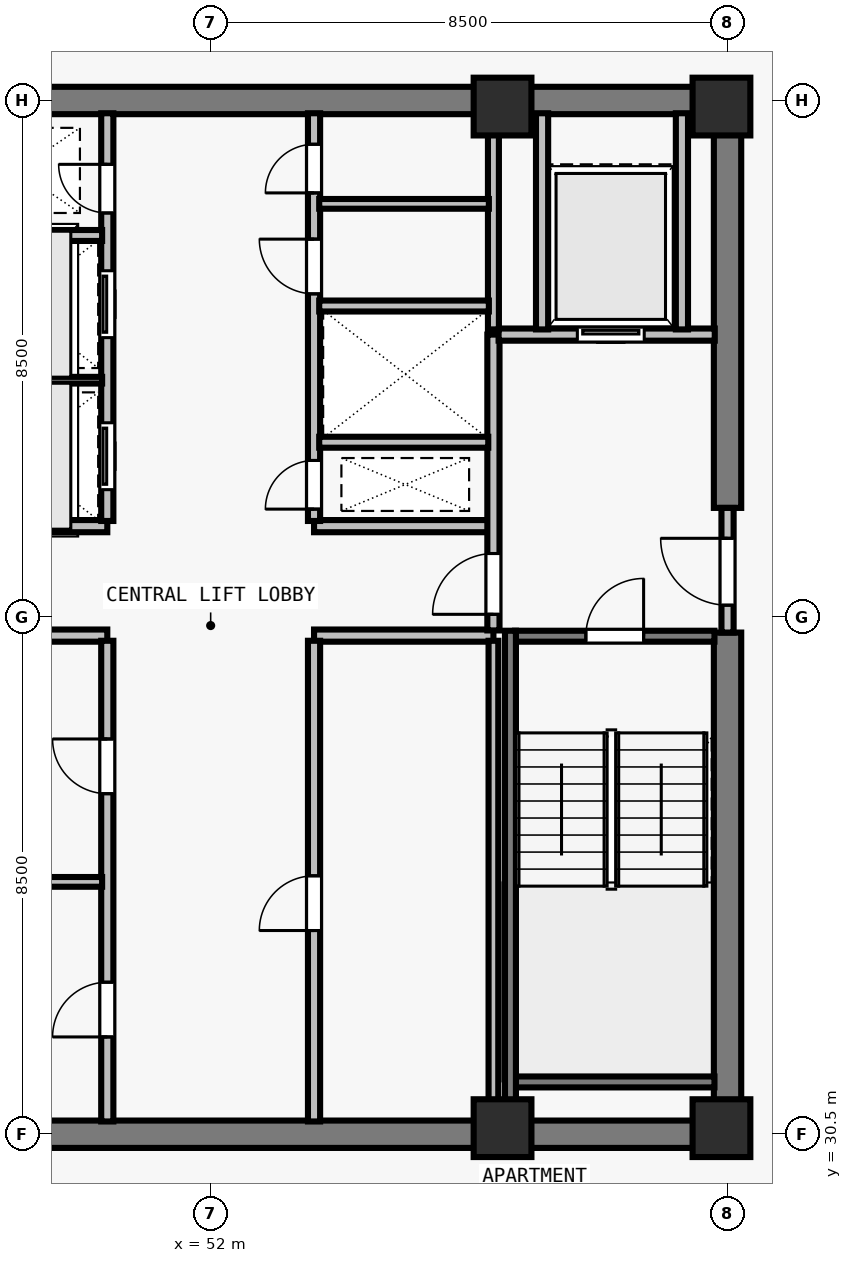
"""IFC4 building model, lengths in metres.
Left out: names, types, materials, properties, quantities, classifications, styles, units other than length and angle.
Written with IfcOpenShell. Run it as: python <this file> out.ifc"""

import sys

from ifc_helpers import new_model, si_unit, direction, frame, frame_2d, origin, origin_2d, place, context, subcontext, project, spatial, rectangle, extrude, element, fill, save


model = new_model("IFC4")
c1 = context("Model", 3, precision=1e-05, world=origin(), true_north=direction((0.0, 1.0)))
c2 = subcontext(c1, "Body", "Model", "MODEL_VIEW")
j1 = project(units=[si_unit("LENGTHUNIT", "METRE"), si_unit("PLANEANGLEUNIT", "RADIAN")], contexts=[c1])
p1 = place(None, origin())
s1 = spatial("IfcSite", under=j1, at=p1, CompositionType="ELEMENT")
p2 = place(p1, origin())
s2 = spatial("IfcBuilding", under=s1, at=p2, CompositionType="ELEMENT")
p3 = place(p2, frame((0.0, 0.0, 213.0)))
s3 = spatial("IfcBuildingStorey", under=s2, at=p3, CompositionType="ELEMENT", Elevation=213.0)
for number, where, z_axis, x_axis in (
    (1, (56.8, 30.6, 0.0), (0.0, 0.0, 1.0), (1.0, 0.0, 0.0)),
    (2, (60.4, 30.6, 0.0), (0.0, 0.0, 1.0), (1.0, 0.0, 0.0)),
    (3, (56.8, 47.4, 0.0), (0.0, 0.0, 1.0), (1.0, 0.0, 0.0)),
    (4, (60.4, 47.4, 0.0), (0.0, 0.0, 1.0), (1.0, 0.0, 0.0)),
):
    element("IfcColumn", number, at=place(p3, frame(where, z_axis=z_axis, x_axis=x_axis)), inside=s3, PredefinedType="COLUMN", context=c2, shape_type="SweptSolid", body=[
        extrude(rectangle(XDim=0.95, YDim=0.95, at=origin_2d()), origin(), (0.0, 0.0, 1.0), 3.5),
    ])
for number, where, z_axis, x_axis in (
    (5, (43.275, 30.5, 0.0), (0.0, 0.0, 1.0), (1.0, 0.0, 0.0)),
    (6, (43.275, 47.5, 0.0), (0.0, 0.0, 1.0), (1.0, 0.0, 0.0)),
):
    element("IfcWall", number, at=place(p3, frame(where, z_axis=z_axis, x_axis=x_axis)), inside=s3, PredefinedType="SHEAR", context=c2, shape_type="SweptSolid", body=[
        extrude(rectangle(XDim=17.45, YDim=0.45, at=frame_2d((8.725, 0.0))), origin(), (0.0, 0.0, 1.0), 3.29),
    ])
p4 = place(p3, frame((60.5, 30.715, 0.0), z_axis=(0.0, 0.0, 1.0), x_axis=(0.0, 1.0, 0.0)))
e7 = element("IfcWall", 7, at=p4, inside=s3, PredefinedType="SHEAR", context=c2, shape_type="SweptSolid", body=[
    extrude(rectangle(XDim=8.035, YDim=0.45, at=frame_2d((4.018, 0.0))), origin(), (0.0, 0.0, 1.0), 3.29),
])
p5 = place(p3, frame((60.5, 40.8, 0.0), z_axis=(0.0, 0.0, 1.0), x_axis=(0.0, 1.0, 0.0)))
e8 = element("IfcWall", 8, at=p5, inside=s3, PredefinedType="SHEAR", context=c2, shape_type="SweptSolid", body=[
    extrude(rectangle(XDim=6.485, YDim=0.45, at=frame_2d((3.242, 0.0))), origin(), (0.0, 0.0, 1.0), 3.29),
])
for number, where, z_axis, x_axis in (
    (9, (47.35, 38.7, 0.0), (0.0, 0.0, 1.0), (1.0, 0.0, 0.0)),
    (10, (47.35, 40.5, 0.0), (0.0, 0.0, 1.0), (1.0, 0.0, 0.0)),
    (11, (53.7, 38.7, 0.0), (0.0, 0.0, 1.0), (1.0, 0.0, 0.0)),
    (12, (53.7, 40.5, 0.0), (0.0, 0.0, 1.0), (1.0, 0.0, 0.0)),
):
    element("IfcWall", number, at=place(p3, frame(where, z_axis=z_axis, x_axis=x_axis)), inside=s3, PredefinedType="SOLIDWALL", context=c2, shape_type="SweptSolid", body=[
        extrude(rectangle(XDim=2.95, YDim=0.2, at=frame_2d((1.475, 0.0))), origin(), (0.0, 0.0, 1.0), 3.29),
    ])
p6 = place(p3, frame((50.3, 30.71, 0.0), z_axis=(0.0, 0.0, 1.0), x_axis=(0.0, 1.0, 0.0)))
e13 = element("IfcWall", 13, at=p6, inside=s3, PredefinedType="SOLIDWALL", context=c2, shape_type="SweptSolid", body=[
    extrude(rectangle(XDim=7.905, YDim=0.2, at=frame_2d((3.953, 0.0))), origin(), (0.0, 0.0, 1.0), 3.29),
])
p7 = place(p6, frame((1.39, 0.0, 0.0)))
e14 = element("IfcOpeningElement", 14, at=p7, cuts=e13, PredefinedType="OPENING", context=c2, shape_type="SweptSolid", body=[
    extrude(rectangle(XDim=0.9, YDim=2.12, at=frame_2d((0.45, 1.06))), frame((0.0, 0.11, 0.0), z_axis=(0.0, -1.0, 0.0), x_axis=(1.0, 0.0, 0.0)), (0.0, 0.0, 1.0), 0.22),
])
p8 = place(p6, frame((5.39, 0.0, 0.0)))
e15 = element("IfcOpeningElement", 15, at=p8, cuts=e13, PredefinedType="OPENING", context=c2, shape_type="SweptSolid", body=[
    extrude(rectangle(XDim=0.9, YDim=2.12, at=frame_2d((0.45, 1.06))), frame((0.0, 0.11, 0.0), z_axis=(0.0, -1.0, 0.0), x_axis=(1.0, 0.0, 0.0)), (0.0, 0.0, 1.0), 0.22),
])
p9 = place(p3, frame((53.7, 30.71, 0.0), z_axis=(0.0, 0.0, 1.0), x_axis=(0.0, 1.0, 0.0)))
e16 = element("IfcWall", 16, at=p9, inside=s3, PredefinedType="SOLIDWALL", context=c2, shape_type="SweptSolid", body=[
    extrude(rectangle(XDim=7.905, YDim=0.2, at=frame_2d((3.953, 0.0))), origin(), (0.0, 0.0, 1.0), 3.29),
])
p10 = place(p9, frame((3.14, 0.0, 0.0)))
e17 = element("IfcOpeningElement", 17, at=p10, cuts=e16, PredefinedType="OPENING", context=c2, shape_type="SweptSolid", body=[
    extrude(rectangle(XDim=0.9, YDim=2.12, at=frame_2d((0.45, 1.06))), frame((0.0, 0.11, 0.0), z_axis=(0.0, -1.0, 0.0), x_axis=(1.0, 0.0, 0.0)), (0.0, 0.0, 1.0), 0.22),
])
p11 = place(p3, frame((50.3, 40.585, 0.0), z_axis=(0.0, 0.0, 1.0), x_axis=(0.0, 1.0, 0.0)))
e18 = element("IfcWall", 18, at=p11, inside=s3, PredefinedType="SOLIDWALL", context=c2, shape_type="SweptSolid", body=[
    extrude(rectangle(XDim=6.705, YDim=0.2, at=frame_2d((3.353, 0.0))), origin(), (0.0, 0.0, 1.0), 3.29),
])
p12 = place(p11, frame((0.515, 0.0, 0.0)))
e19 = element("IfcOpeningElement", 19, at=p12, cuts=e18, PredefinedType="OPENING", context=c2, shape_type="SweptSolid", body=[
    extrude(rectangle(XDim=1.1, YDim=2.2, at=frame_2d((0.55, 1.1))), frame((0.0, 0.11, 0.0), z_axis=(0.0, -1.0, 0.0), x_axis=(1.0, 0.0, 0.0)), (0.0, 0.0, 1.0), 0.22),
])
p13 = place(p11, frame((3.015, 0.0, 0.0)))
e20 = element("IfcOpeningElement", 20, at=p13, cuts=e18, PredefinedType="OPENING", context=c2, shape_type="SweptSolid", body=[
    extrude(rectangle(XDim=1.1, YDim=2.2, at=frame_2d((0.55, 1.1))), frame((0.0, 0.11, 0.0), z_axis=(0.0, -1.0, 0.0), x_axis=(1.0, 0.0, 0.0)), (0.0, 0.0, 1.0), 0.22),
])
p14 = place(p11, frame((5.065, 0.0, 0.0)))
e21 = element("IfcOpeningElement", 21, at=p14, cuts=e18, PredefinedType="OPENING", context=c2, shape_type="SweptSolid", body=[
    extrude(rectangle(XDim=0.8, YDim=2.08, at=frame_2d((0.4, 1.04))), frame((0.0, 0.11, 0.0), z_axis=(0.0, -1.0, 0.0), x_axis=(1.0, 0.0, 0.0)), (0.0, 0.0, 1.0), 0.22),
])
p15 = place(p3, frame((53.7, 40.585, 0.0), z_axis=(0.0, 0.0, 1.0), x_axis=(0.0, 1.0, 0.0)))
e22 = element("IfcWall", 22, at=p15, inside=s3, PredefinedType="SOLIDWALL", context=c2, shape_type="SweptSolid", body=[
    extrude(rectangle(XDim=6.705, YDim=0.2, at=frame_2d((3.353, 0.0))), origin(), (0.0, 0.0, 1.0), 3.29),
])
p16 = place(p15, frame((0.195, 0.0, 0.0)))
e23 = element("IfcOpeningElement", 23, at=p16, cuts=e22, PredefinedType="OPENING", context=c2, shape_type="SweptSolid", body=[
    extrude(rectangle(XDim=0.8, YDim=2.08, at=frame_2d((0.4, 1.04))), frame((0.0, 0.11, 0.0), z_axis=(0.0, -1.0, 0.0), x_axis=(1.0, 0.0, 0.0)), (0.0, 0.0, 1.0), 0.22),
])
p17 = place(p15, frame((3.735, 0.0, 0.0)))
e24 = element("IfcOpeningElement", 24, at=p17, cuts=e22, PredefinedType="OPENING", context=c2, shape_type="SweptSolid", body=[
    extrude(rectangle(XDim=0.9, YDim=2.12, at=frame_2d((0.45, 1.06))), frame((0.0, 0.11, 0.0), z_axis=(0.0, -1.0, 0.0), x_axis=(1.0, 0.0, 0.0)), (0.0, 0.0, 1.0), 0.22),
])
p18 = place(p15, frame((5.395, 0.0, 0.0)))
e25 = element("IfcOpeningElement", 25, at=p18, cuts=e22, PredefinedType="OPENING", context=c2, shape_type="SweptSolid", body=[
    extrude(rectangle(XDim=0.8, YDim=2.1, at=frame_2d((0.4, 1.05))), frame((0.0, 0.11, 0.0), z_axis=(0.0, -1.0, 0.0), x_axis=(1.0, 0.0, 0.0)), (0.0, 0.0, 1.0), 0.22),
])
p19 = place(p3, frame((60.5, 38.75, 0.0), z_axis=(0.0, 0.0, 1.0), x_axis=(0.0, 1.0, 0.0)))
e26 = element("IfcWall", 26, at=p19, inside=s3, PredefinedType="SOLIDWALL", context=c2, shape_type="SweptSolid", body=[
    extrude(rectangle(XDim=2.05, YDim=0.2, at=frame_2d((1.025, 0.0))), origin(), (0.0, 0.0, 1.0), 3.29),
])
p20 = place(p19, frame((0.45, 0.0, 0.0)))
e27 = element("IfcOpeningElement", 27, at=p20, cuts=e26, PredefinedType="OPENING", context=c2, shape_type="SweptSolid", body=[
    extrude(rectangle(XDim=1.1, YDim=2.15, at=frame_2d((0.55, 1.075))), frame((0.0, 0.11, 0.0), z_axis=(0.0, -1.0, 0.0), x_axis=(1.0, 0.0, 0.0)), (0.0, 0.0, 1.0), 0.22),
])
p21 = place(p3, frame((56.65, 38.785, 0.0), z_axis=(0.0, 0.0, 1.0), x_axis=(0.0, 1.0, 0.0)))
e28 = element("IfcWall", 28, at=p21, inside=s3, PredefinedType="SOLIDWALL", context=c2, shape_type="SweptSolid", body=[
    extrude(rectangle(XDim=4.865, YDim=0.2, at=frame_2d((2.433, 0.0))), origin(), (0.0, 0.0, 1.0), 3.29),
])
p22 = place(p21, frame((0.265, 0.0, 0.0)))
e29 = element("IfcOpeningElement", 29, at=p22, cuts=e28, PredefinedType="OPENING", context=c2, shape_type="SweptSolid", body=[
    extrude(rectangle(XDim=1.0, YDim=2.15, at=frame_2d((0.5, 1.075))), frame((0.0, 0.11, 0.0), z_axis=(0.0, -1.0, 0.0), x_axis=(1.0, 0.0, 0.0)), (0.0, 0.0, 1.0), 0.22),
])
p23 = place(p3, frame((56.735, 43.65, 0.0), z_axis=(0.0, 0.0, 1.0), x_axis=(1.0, 0.0, 0.0)))
e30 = element("IfcWall", 30, at=p23, inside=s3, PredefinedType="SOLIDWALL", context=c2, shape_type="SweptSolid", body=[
    extrude(rectangle(XDim=3.555, YDim=0.2, at=frame_2d((1.777, 0.0))), origin(), (0.0, 0.0, 1.0), 3.29),
])
p24 = place(p23, frame((1.295, 0.0, 0.0)))
e31 = element("IfcOpeningElement", 31, at=p24, cuts=e30, PredefinedType="OPENING", context=c2, shape_type="SweptSolid", body=[
    extrude(rectangle(XDim=1.1, YDim=2.2, at=frame_2d((0.55, 1.1))), frame((0.0, 0.11, 0.0), z_axis=(0.0, -1.0, 0.0), x_axis=(1.0, 0.0, 0.0)), (0.0, 0.0, 1.0), 0.22),
])
for number, where, z_axis, x_axis in (
    (32, (57.45, 43.735, 0.0), (0.0, 0.0, 1.0), (0.0, 1.0, 0.0)),
    (33, (59.75, 43.735, 0.0), (0.0, 0.0, 1.0), (0.0, 1.0, 0.0)),
):
    element("IfcWall", number, at=place(p3, frame(where, z_axis=z_axis, x_axis=x_axis)), inside=s3, PredefinedType="SOLIDWALL", context=c2, shape_type="SweptSolid", body=[
        extrude(rectangle(XDim=3.555, YDim=0.2, at=frame_2d((1.777, 0.0))), origin(), (0.0, 0.0, 1.0), 3.29),
    ])
p25 = place(p3, frame((47.415, 34.65, 0.0), z_axis=(0.0, 0.0, 1.0), x_axis=(1.0, 0.0, 0.0)))
e34 = element("IfcWall", 34, at=p25, inside=s3, PredefinedType="PARTITIONING", context=c2, shape_type="SweptSolid", body=[
    extrude(rectangle(XDim=2.8, YDim=0.16, at=frame_2d((1.4, 0.0))), origin(), (0.0, 0.0, 1.0), 3.29),
])
p26 = place(p3, frame((56.65, 30.71, 0.0), z_axis=(0.0, 0.0, 1.0), x_axis=(0.0, 1.0, 0.0)))
e35 = element("IfcWall", 35, at=p26, inside=s3, PredefinedType="PARTITIONING", context=c2, shape_type="SweptSolid", body=[
    extrude(rectangle(XDim=7.905, YDim=0.16, at=frame_2d((3.953, 0.0))), origin(), (0.0, 0.0, 1.0), 3.29),
])
p27 = place(p3, frame((47.435, 42.9, 0.0), z_axis=(0.0, 0.0, 1.0), x_axis=(1.0, 0.0, 0.0)))
e36 = element("IfcWall", 36, at=p27, inside=s3, PredefinedType="PARTITIONING", context=c2, shape_type="SweptSolid", body=[
    extrude(rectangle(XDim=2.78, YDim=0.11, at=frame_2d((1.39, 0.0))), origin(), (0.0, 0.0, 1.0), 3.29),
])
p28 = place(p3, frame((47.425, 45.28, 0.0), z_axis=(0.0, 0.0, 1.0), x_axis=(1.0, 0.0, 0.0)))
e37 = element("IfcWall", 37, at=p28, inside=s3, PredefinedType="SOLIDWALL", context=c2, shape_type="SweptSolid", body=[
    extrude(rectangle(XDim=2.79, YDim=0.18, at=frame_2d((1.395, 0.0))), origin(), (0.0, 0.0, 1.0), 3.29),
])
p29 = place(p3, frame((56.65, 43.735, 0.0), z_axis=(0.0, 0.0, 1.0), x_axis=(0.0, 1.0, 0.0)))
e38 = element("IfcWall", 38, at=p29, inside=s3, PredefinedType="SOLIDWALL", context=c2, shape_type="SweptSolid", body=[
    extrude(rectangle(XDim=3.555, YDim=0.18, at=frame_2d((1.777, 0.0))), origin(), (0.0, 0.0, 1.0), 3.29),
])
p30 = place(p3, frame((53.785, 41.88, 0.0), z_axis=(0.0, 0.0, 1.0), x_axis=(1.0, 0.0, 0.0)))
e39 = element("IfcWall", 39, at=p30, inside=s3, PredefinedType="SOLIDWALL", context=c2, shape_type="SweptSolid", body=[
    extrude(rectangle(XDim=2.78, YDim=0.18, at=frame_2d((1.39, 0.0))), origin(), (0.0, 0.0, 1.0), 3.29),
])
p31 = place(p3, frame((53.785, 44.12, 0.0), z_axis=(0.0, 0.0, 1.0), x_axis=(1.0, 0.0, 0.0)))
e40 = element("IfcWall", 40, at=p31, inside=s3, PredefinedType="SOLIDWALL", context=c2, shape_type="SweptSolid", body=[
    extrude(rectangle(XDim=2.79, YDim=0.18, at=frame_2d((1.395, 0.0))), origin(), (0.0, 0.0, 1.0), 3.29),
])
p32 = place(p3, frame((53.785, 45.8, 0.0), z_axis=(0.0, 0.0, 1.0), x_axis=(1.0, 0.0, 0.0)))
e41 = element("IfcWall", 41, at=p32, inside=s3, PredefinedType="PARTITIONING", context=c2, shape_type="SweptSolid", body=[
    extrude(rectangle(XDim=2.79, YDim=0.16, at=frame_2d((1.395, 0.0))), origin(), (0.0, 0.0, 1.0), 3.29),
])
p33 = place(p3, frame((57.005, 38.69, 0.0), z_axis=(0.0, 0.0, 1.0), x_axis=(1.0, 0.0, 0.0)))
e42 = element("IfcWall", 42, at=p33, inside=s3, PredefinedType="SOLIDWALL", context=c2, shape_type="SweptSolid", body=[
    extrude(rectangle(XDim=3.28, YDim=0.18, at=frame_2d((1.64, 0.0))), origin(), (0.0, 0.0, 1.0), 3.29),
])
p34 = place(p33, frame((1.165, 0.0, 0.0)))
e43 = element("IfcOpeningElement", 43, at=p34, cuts=e42, PredefinedType="OPENING", context=c2, shape_type="SweptSolid", body=[
    extrude(rectangle(XDim=0.95, YDim=2.15, at=frame_2d((0.475, 1.075))), frame((0.0, 0.1, 0.0), z_axis=(0.0, -1.0, 0.0), x_axis=(1.0, 0.0, 0.0)), (0.0, 0.0, 1.0), 0.2),
])
p35 = place(p3, frame((57.005, 31.36, 0.0), z_axis=(0.0, 0.0, 1.0), x_axis=(1.0, 0.0, 0.0)))
e44 = element("IfcWall", 44, at=p35, inside=s3, PredefinedType="SOLIDWALL", context=c2, shape_type="SweptSolid", body=[
    extrude(rectangle(XDim=3.28, YDim=0.18, at=frame_2d((1.64, 0.0))), origin(), (0.0, 0.0, 1.0), 3.29),
])
p36 = place(p3, frame((56.93, 38.78, 0.0), z_axis=(0.0, 0.0, 1.0), x_axis=(0.0, -1.0, 0.0)))
e45 = element("IfcWall", 45, at=p36, inside=s3, PredefinedType="SOLIDWALL", context=c2, shape_type="SweptSolid", body=[
    extrude(rectangle(XDim=8.067, YDim=0.18, at=frame_2d((4.034, 0.0))), origin(), (0.0, 0.0, 1.0), 3.29),
])
p37 = place(p20, origin())
e46 = element("IfcDoor", 46, at=p37, inside=s3, OperationType="SINGLE_SWING_RIGHT", PredefinedType="DOOR", context=c2, shape_type="SweptSolid", body=[
    extrude(rectangle(XDim=1.1, YDim=2.15, at=frame_2d((0.55, 1.075))), frame((0.0, 0.025, 0.0), z_axis=(0.0, -1.0, 0.0), x_axis=(1.0, 0.0, 0.0)), (0.0, 0.0, 1.0), 0.05),
])
fill(e27, e46)
p38 = place(p22, origin())
e47 = element("IfcDoor", 47, at=p38, inside=s3, OperationType="SINGLE_SWING_LEFT", PredefinedType="DOOR", context=c2, shape_type="SweptSolid", body=[
    extrude(rectangle(XDim=1.0, YDim=2.15, at=frame_2d((0.5, 1.075))), frame((0.0, 0.025, 0.0), z_axis=(0.0, -1.0, 0.0), x_axis=(1.0, 0.0, 0.0)), (0.0, 0.0, 1.0), 0.05),
])
fill(e29, e47)
p39 = place(p24, origin())
e48 = element("IfcDoor", 48, at=p39, inside=s3, OperationType="SLIDING_TO_LEFT", PredefinedType="DOOR", context=c2, shape_type="SweptSolid", body=[
    extrude(rectangle(XDim=1.1, YDim=2.2, at=frame_2d((0.55, 1.1))), frame((0.0, 0.025, 0.0), z_axis=(0.0, -1.0, 0.0), x_axis=(1.0, 0.0, 0.0)), (0.0, 0.0, 1.0), 0.05),
])
fill(e31, e48)
p40 = place(p7, origin())
e49 = element("IfcDoor", 49, at=p40, inside=s3, OperationType="SINGLE_SWING_LEFT", PredefinedType="DOOR", context=c2, shape_type="SweptSolid", body=[
    extrude(rectangle(XDim=0.9, YDim=2.12, at=frame_2d((0.45, 1.06))), frame((0.0, 0.025, 0.0), z_axis=(0.0, -1.0, 0.0), x_axis=(1.0, 0.0, 0.0)), (0.0, 0.0, 1.0), 0.05),
])
fill(e14, e49)
p41 = place(p8, origin())
e50 = element("IfcDoor", 50, at=p41, inside=s3, OperationType="SINGLE_SWING_RIGHT", PredefinedType="DOOR", context=c2, shape_type="SweptSolid", body=[
    extrude(rectangle(XDim=0.9, YDim=2.12, at=frame_2d((0.45, 1.06))), frame((0.0, 0.025, 0.0), z_axis=(0.0, -1.0, 0.0), x_axis=(1.0, 0.0, 0.0)), (0.0, 0.0, 1.0), 0.05),
])
fill(e15, e50)
p42 = place(p10, origin())
e51 = element("IfcDoor", 51, at=p42, inside=s3, OperationType="SINGLE_SWING_LEFT", PredefinedType="DOOR", context=c2, shape_type="SweptSolid", body=[
    extrude(rectangle(XDim=0.9, YDim=2.12, at=frame_2d((0.45, 1.06))), frame((0.0, 0.025, 0.0), z_axis=(0.0, -1.0, 0.0), x_axis=(1.0, 0.0, 0.0)), (0.0, 0.0, 1.0), 0.05),
])
fill(e17, e51)
p43 = place(p12, origin())
e52 = element("IfcDoor", 52, at=p43, inside=s3, OperationType="SLIDING_TO_LEFT", PredefinedType="DOOR", context=c2, shape_type="SweptSolid", body=[
    extrude(rectangle(XDim=1.1, YDim=2.2, at=frame_2d((0.55, 1.1))), frame((0.0, 0.025, 0.0), z_axis=(0.0, -1.0, 0.0), x_axis=(1.0, 0.0, 0.0)), (0.0, 0.0, 1.0), 0.05),
])
fill(e19, e52)
p44 = place(p13, origin())
e53 = element("IfcDoor", 53, at=p44, inside=s3, OperationType="SLIDING_TO_LEFT", PredefinedType="DOOR", context=c2, shape_type="SweptSolid", body=[
    extrude(rectangle(XDim=1.1, YDim=2.2, at=frame_2d((0.55, 1.1))), frame((0.0, 0.025, 0.0), z_axis=(0.0, -1.0, 0.0), x_axis=(1.0, 0.0, 0.0)), (0.0, 0.0, 1.0), 0.05),
])
fill(e20, e53)
p45 = place(p14, origin())
e54 = element("IfcDoor", 54, at=p45, inside=s3, OperationType="SINGLE_SWING_RIGHT", PredefinedType="DOOR", context=c2, shape_type="SweptSolid", body=[
    extrude(rectangle(XDim=0.8, YDim=2.08, at=frame_2d((0.4, 1.04))), frame((0.0, 0.025, 0.0), z_axis=(0.0, -1.0, 0.0), x_axis=(1.0, 0.0, 0.0)), (0.0, 0.0, 1.0), 0.05),
])
fill(e21, e54)
p46 = place(p16, origin())
e55 = element("IfcDoor", 55, at=p46, inside=s3, OperationType="SINGLE_SWING_LEFT", PredefinedType="DOOR", context=c2, shape_type="SweptSolid", body=[
    extrude(rectangle(XDim=0.8, YDim=2.08, at=frame_2d((0.4, 1.04))), frame((0.0, 0.025, 0.0), z_axis=(0.0, -1.0, 0.0), x_axis=(1.0, 0.0, 0.0)), (0.0, 0.0, 1.0), 0.05),
])
fill(e23, e55)
p47 = place(p17, origin())
e56 = element("IfcDoor", 56, at=p47, inside=s3, OperationType="SINGLE_SWING_RIGHT", PredefinedType="DOOR", context=c2, shape_type="SweptSolid", body=[
    extrude(rectangle(XDim=0.9, YDim=2.12, at=frame_2d((0.45, 1.06))), frame((0.0, 0.025, 0.0), z_axis=(0.0, -1.0, 0.0), x_axis=(1.0, 0.0, 0.0)), (0.0, 0.0, 1.0), 0.05),
])
fill(e24, e56)
p48 = place(p18, origin())
e57 = element("IfcDoor", 57, at=p48, inside=s3, OperationType="SINGLE_SWING_LEFT", PredefinedType="DOOR", context=c2, shape_type="SweptSolid", body=[
    extrude(rectangle(XDim=0.8, YDim=2.1, at=frame_2d((0.4, 1.05))), frame((0.0, 0.025, 0.0), z_axis=(0.0, -1.0, 0.0), x_axis=(1.0, 0.0, 0.0)), (0.0, 0.0, 1.0), 0.05),
])
fill(e25, e57)
p49 = place(p34, origin())
e58 = element("IfcDoor", 58, at=p49, inside=s3, OperationType="SINGLE_SWING_RIGHT", PredefinedType="DOOR", context=c2, shape_type="SweptSolid", body=[
    extrude(rectangle(XDim=0.95, YDim=2.15, at=frame_2d((0.475, 1.075))), frame((0.0, 0.025, 0.0), z_axis=(0.0, -1.0, 0.0), x_axis=(1.0, 0.0, 0.0)), (0.0, 0.0, 1.0), 0.05),
])
fill(e43, e58)
save(model, sys.argv[1])
